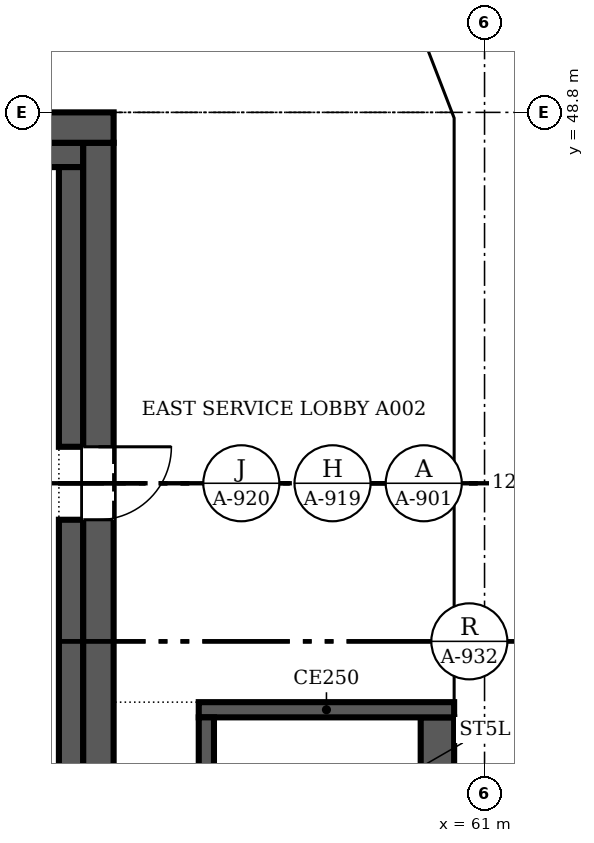
"""IFC4 building model, lengths in metres.
Left out: names, types, materials, properties, quantities, classifications, styles, units other than length and angle.
Written with IfcOpenShell. Run it as: python <this file> out.ifc"""

import sys

from ifc_helpers import new_model, si_unit, direction, frame, frame_2d, origin, place, context, subcontext, project, spatial, polyline, rectangle, outline, extrude, faceted_brep, source, transform, mapped, element, fill, save


model = new_model("IFC4")
c1 = context("Model", 3, precision=1e-05, world=origin(), true_north=direction((0.0, 1.0)))
c2 = subcontext(c1, "Body", "Model", "MODEL_VIEW")
j1 = project(units=[si_unit("LENGTHUNIT", "METRE"), si_unit("PLANEANGLEUNIT", "RADIAN")], contexts=[c1])
p1 = place(None, origin())
s1 = spatial("IfcSite", under=j1, at=p1, CompositionType="ELEMENT")
p2 = place(p1, origin())
s2 = spatial("IfcBuilding", under=s1, at=p2, CompositionType="ELEMENT")
p3 = place(p2, frame((0.0, 0.0, 209.3)))
s3 = spatial("IfcBuildingStorey", under=s2, at=p3, CompositionType="ELEMENT", Elevation=209.3)
m1 = source(origin(), c2, "Body", "Brep", [
    faceted_brep([(3.05, -0.25, 0.0), (6.1, -0.25, 3.8), (6.1, -0.25, 3.8), (3.05, -0.25, 7.6), (0.0, -0.25, 3.8), (0.0, 0.25, 3.8), (3.05, 0.25, 7.6), (6.1, 0.25, 3.8), (6.1, 0.25, 3.8), (3.05, 0.25, 0.0)], [[[0, 1, 2, 3, 4]], [[5, 6, 7, 8, 9]], [[9, 8, 1, 0]], [[7, 6, 3, 2]], [[6, 5, 4, 3]], [[5, 9, 0, 4]], [[1, 8, 7, 2]]]),
])
p4 = place(p3, frame((60.75, 33.55, -3.8), z_axis=(0.0, 0.0, 1.0), x_axis=(0.0, 1.0, 0.0)))
e1 = element("IfcWall", 1, at=p4, inside=s3, PredefinedType="SOLIDWALL", context=c2, shape_type="MappedRepresentation", body=[
    mapped(m1, transform((0.0, 0.0, 0.0), scale=1.0)),
])
m2 = source(origin(), c2, "Body", "SweptSolid", [
    extrude(outline(polyline([(3.05, 0.399), (5.78, 3.8), (3.05, 7.201), (0.321, 3.8), (3.05, 0.399)])), frame((0.0, 0.26, 0.0), z_axis=(0.0, -1.0, 0.0), x_axis=(1.0, 0.0, 0.0)), (0.0, 0.0, 1.0), 0.52),
])
p5 = place(p4, origin())
e2 = element("IfcOpeningElement", 2, at=p5, cuts=e1, PredefinedType="OPENING", context=c2, shape_type="MappedRepresentation", body=[
    mapped(m2, transform((0.0, 0.0, 0.0), scale=1.0)),
])
m3 = source(origin(), c2, "Body", "SweptSolid", [
    extrude(outline(polyline([(3.05, 0.0), (6.1, 3.8), (3.05, 7.6), (0.0, 3.8), (3.05, 0.0)])), frame((0.0, 0.25, 0.0), z_axis=(0.0, -1.0, 0.0), x_axis=(1.0, 0.0, 0.0)), (0.0, 0.0, 1.0), 0.5),
])
p6 = place(p3, frame((60.75, 39.65, -3.8), z_axis=(0.0, 0.0, 1.0), x_axis=(0.0, 1.0, 0.0)))
e3 = element("IfcWall", 3, at=p6, inside=s3, PredefinedType="SOLIDWALL", context=c2, shape_type="MappedRepresentation", body=[
    mapped(m3, transform((0.0, 0.0, 0.0), scale=1.0)),
])
p7 = place(p6, origin())
e4 = element("IfcOpeningElement", 4, at=p7, cuts=e3, PredefinedType="OPENING", context=c2, shape_type="MappedRepresentation", body=[
    mapped(m2, transform((0.0, 0.0, 0.0), scale=1.0)),
])
m4 = source(origin(), c2, "Body", "Brep", [
    faceted_brep([(3.003, -0.25, 0.0), (3.05, -0.25, 0.06), (3.05, -0.25, 7.54), (3.003, -0.25, 7.6), (0.0, -0.25, 3.8), (0.0, 0.25, 3.8), (2.957, 0.25, 7.541), (2.957, 0.25, 0.059), (3.003, 0.0, 0.0), (3.003, 0.0, 7.6)], [[[0, 1, 2, 3, 4]], [[5, 6, 7]], [[1, 0, 8]], [[9, 3, 2]], [[6, 5, 4, 3, 9]], [[5, 7, 8, 0, 4]], [[1, 8, 7, 6, 9, 2]]]),
])
p8 = place(p3, frame((60.75, 45.75, -3.8), z_axis=(0.0, 0.0, 1.0), x_axis=(0.0, 1.0, 0.0)))
e5 = element("IfcWall", 5, at=p8, inside=s3, PredefinedType="SOLIDWALL", context=c2, shape_type="MappedRepresentation", body=[
    mapped(m4, transform((0.0, 0.0, 0.0), scale=1.0)),
])
m5 = source(origin(), c2, "Body", "SweptSolid", [
    extrude(outline(polyline([(2.803, 6.944), (0.319, 3.8), (2.803, 0.656), (2.803, 6.944)])), frame((0.0, 0.26, 0.0), z_axis=(0.0, -1.0, 0.0), x_axis=(1.0, 0.0, 0.0)), (0.0, 0.0, 1.0), 0.52),
])
p9 = place(p8, origin())
e6 = element("IfcOpeningElement", 6, at=p9, cuts=e5, PredefinedType="OPENING", context=c2, shape_type="MappedRepresentation", body=[
    mapped(m5, transform((0.0, 0.0, 0.0), scale=1.0)),
])
m6 = source(origin(), c2, "Body", "Brep", [
    faceted_brep([(0.047, -0.25, 0.0), (2.997, -0.25, 3.8), (0.047, -0.25, 7.6), (0.0, -0.25, 7.541), (0.0, -0.25, 0.059), (0.093, 0.25, 7.54), (2.944, 0.25, 3.868), (2.944, 0.25, 3.732), (0.093, 0.25, 0.06), (2.997, 0.0, 3.8), (0.047, 0.0, 0.0), (0.047, 0.0, 7.6)], [[[0, 1, 2, 3, 4]], [[5, 6, 7, 8]], [[8, 7, 9, 1, 0, 10]], [[6, 5, 11, 2, 1, 9]], [[3, 2, 11]], [[10, 0, 4]], [[8, 10, 4, 3, 11, 5]], [[9, 7, 6]]]),
])
p10 = place(p3, frame((60.767, 48.71, -3.8), z_axis=(0.0, 0.0, 1.0), x_axis=(-0.359901446078, 0.932990326376, 0.0)))
e7 = element("IfcWall", 7, at=p10, inside=s3, PredefinedType="SOLIDWALL", context=c2, shape_type="MappedRepresentation", body=[
    mapped(m6, transform((0.0, 0.0, 0.0), scale=1.0)),
])
m7 = source(origin(), c2, "Body", "SweptSolid", [
    extrude(outline(polyline([(0.247, 0.665), (2.681, 3.8), (0.247, 6.935), (0.247, 0.665)])), frame((0.0, 0.26, 0.0), z_axis=(0.0, -1.0, 0.0), x_axis=(1.0, 0.0, 0.0)), (0.0, 0.0, 1.0), 0.52),
])
p11 = place(p10, origin())
e8 = element("IfcOpeningElement", 8, at=p11, cuts=e7, PredefinedType="OPENING", context=c2, shape_type="MappedRepresentation", body=[
    mapped(m7, transform((0.0, 0.0, 0.0), scale=1.0)),
])
p12 = place(p2, frame((0.0, 0.0, 213.1)))
s4 = spatial("IfcBuildingStorey", under=s2, at=p12, CompositionType="ELEMENT", Elevation=213.1)
m8 = source(origin(), c2, "Body", "Brep", [
    faceted_brep([(3.05, -0.25, 0.0), (6.1, -0.25, 3.8), (6.1, -0.25, 3.8), (3.05, -0.25, 7.6), (0.0, -0.25, 3.8), (0.0, 0.25, 3.8), (3.05, 0.25, 7.6), (6.1, 0.25, 3.8), (6.1, 0.25, 3.8), (3.05, 0.25, 0.0)], [[[0, 1, 2, 3, 4]], [[5, 6, 7, 8, 9]], [[9, 8, 1, 0]], [[7, 6, 3, 2]], [[6, 5, 4, 3]], [[5, 9, 0, 4]], [[1, 8, 7, 2]]]),
])
p13 = place(p12, frame((60.75, 36.6, -3.8), z_axis=(0.0, 0.0, 1.0), x_axis=(0.0, 1.0, 0.0)))
e9 = element("IfcWall", 9, at=p13, inside=s4, PredefinedType="SOLIDWALL", context=c2, shape_type="MappedRepresentation", body=[
    mapped(m8, transform((0.0, 0.0, 0.0), scale=1.0)),
])
m9 = source(origin(), c2, "Body", "SweptSolid", [
    extrude(outline(polyline([(3.05, 0.399), (5.78, 3.8), (3.05, 7.2), (0.321, 3.8), (3.05, 0.399)])), frame((0.0, 0.26, 0.0), z_axis=(0.0, -1.0, 0.0), x_axis=(1.0, 0.0, 0.0)), (0.0, 0.0, 1.0), 0.52),
])
p14 = place(p13, origin())
e10 = element("IfcOpeningElement", 10, at=p14, cuts=e9, PredefinedType="OPENING", context=c2, shape_type="MappedRepresentation", body=[
    mapped(m9, transform((0.0, 0.0, 0.0), scale=1.0)),
])
m10 = source(origin(), c2, "Body", "Brep", [
    faceted_brep([(3.05, -0.25, 0.0), (6.053, -0.25, 3.8), (3.05, -0.25, 7.6), (0.0, -0.25, 3.8), (0.0, 0.25, 3.8), (3.05, 0.25, 7.6), (6.007, 0.25, 3.859), (6.007, 0.25, 3.741), (3.05, 0.25, 0.0), (6.053, 0.0, 3.8)], [[[0, 1, 2, 3]], [[4, 5, 6, 7, 8]], [[8, 7, 9, 1, 0]], [[6, 5, 2, 1, 9]], [[5, 4, 3, 2]], [[4, 8, 0, 3]], [[7, 6, 9]]]),
])
p15 = place(p12, frame((60.75, 42.7, -3.8), z_axis=(0.0, 0.0, 1.0), x_axis=(0.0, 1.0, 0.0)))
e11 = element("IfcWall", 11, at=p15, inside=s4, PredefinedType="SOLIDWALL", context=c2, shape_type="MappedRepresentation", body=[
    mapped(m10, transform((0.0, 0.0, 0.0), scale=1.0)),
])
m11 = source(origin(), c2, "Body", "SweptSolid", [
    extrude(outline(polyline([(3.049, 0.401), (5.735, 3.8), (3.049, 7.199), (0.321, 3.8), (3.049, 0.401)])), frame((0.0, 0.26, 0.0), z_axis=(0.0, -1.0, 0.0), x_axis=(1.0, 0.0, 0.0)), (0.0, 0.0, 1.0), 0.52),
])
p16 = place(p15, origin())
e12 = element("IfcOpeningElement", 12, at=p16, cuts=e11, PredefinedType="OPENING", context=c2, shape_type="MappedRepresentation", body=[
    mapped(m11, transform((0.0, 0.0, 0.0), scale=1.0)),
])
m12 = source(origin(), c2, "Body", "Brep", [
    faceted_brep([(2.95, -0.25, 0.0), (3.003, -0.25, 0.068), (3.003, -0.25, 7.531), (2.95, -0.25, 7.6), (0.0, -0.25, 3.8), (0.047, 0.25, 3.86), (2.898, 0.25, 7.532), (2.898, 0.25, 0.068), (0.047, 0.25, 3.74), (2.95, 0.0, 0.0), (2.95, 0.0, 7.6), (0.0, 0.0, 3.8)], [[[0, 1, 2, 3, 4]], [[5, 6, 7, 8]], [[1, 0, 9]], [[10, 3, 2]], [[6, 5, 11, 4, 3, 10]], [[8, 7, 9, 0, 4, 11]], [[8, 11, 5]], [[1, 9, 7, 6, 10, 2]]]),
])
p17 = place(p12, frame((60.75, 48.753, -3.8), z_axis=(0.0, 0.0, 1.0), x_axis=(-0.35992665181, 0.932980602862, 0.0)))
e13 = element("IfcWall", 13, at=p17, inside=s4, PredefinedType="SOLIDWALL", context=c2, shape_type="MappedRepresentation", body=[
    mapped(m12, transform((0.0, 0.0, 0.0), scale=1.0)),
])
m13 = source(origin(), c2, "Body", "SweptSolid", [
    extrude(outline(polyline([(2.75, 6.935), (0.316, 3.8), (2.75, 0.665), (2.75, 6.935)])), frame((0.0, 0.26, 0.0), z_axis=(0.0, -1.0, 0.0), x_axis=(1.0, 0.0, 0.0)), (0.0, 0.0, 1.0), 0.52),
])
p18 = place(p17, origin())
e14 = element("IfcOpeningElement", 14, at=p18, cuts=e13, PredefinedType="OPENING", context=c2, shape_type="MappedRepresentation", body=[
    mapped(m13, transform((0.0, 0.0, 0.0), scale=1.0)),
])
p19 = place(p3, frame((30.5, 48.55, 0.0), z_axis=(0.0, 0.0, 1.0), x_axis=(1.0, 0.0, 0.0)))
e15 = element("IfcWall", 15, at=p19, inside=s3, PredefinedType="SHEAR", context=c2, shape_type="SweptSolid", body=[
    extrude(rectangle(XDim=24.4, YDim=0.5, at=frame_2d((12.2, 0.0))), origin(), (0.0, 0.0, 1.0), 3.8),
])
p20 = place(p3, frame((54.65, 48.3, 0.0), z_axis=(0.0, 0.0, 1.0), x_axis=(0.0, -1.0, 0.0)))
e16 = element("IfcWall", 16, at=p20, inside=s3, PredefinedType="SHEAR", context=c2, shape_type="SweptSolid", body=[
    extrude(rectangle(XDim=23.4, YDim=0.5, at=frame_2d((11.7, 0.0))), origin(), (0.0, 0.0, 1.0), 3.8),
])
m14 = source(origin(), c2, "Body", "SweptSolid", [
    extrude(rectangle(XDim=1.2, YDim=2.1, at=frame_2d((0.6, 1.05))), frame((0.0, 0.26, 0.0), z_axis=(0.0, -1.0, 0.0), x_axis=(1.0, 0.0, 0.0)), (0.0, 0.0, 1.0), 0.52),
])
p21 = place(p20, frame((5.0, 0.0, 0.0)))
e17 = element("IfcOpeningElement", 17, at=p21, cuts=e16, PredefinedType="OPENING", context=c2, shape_type="MappedRepresentation", body=[
    mapped(m14, transform((0.0, 0.0, 0.0), scale=1.0)),
])
p22 = place(p3, frame((31.0, 48.1, 0.0), z_axis=(0.0, 0.0, 1.0), x_axis=(1.0, 0.0, 0.0)))
e18 = element("IfcWall", 18, at=p22, inside=s3, PredefinedType="SOLIDWALL", context=c2, shape_type="SweptSolid", body=[
    extrude(rectangle(XDim=23.4, YDim=0.4, at=frame_2d((11.7, 0.0))), origin(), (0.0, 0.0, 1.0), 3.8),
])
p23 = place(p3, frame((54.2, 36.88, 0.0), z_axis=(0.0, 0.0, 1.0), x_axis=(0.0, 1.0, 0.0)))
e19 = element("IfcWall", 19, at=p23, inside=s3, PredefinedType="SOLIDWALL", context=c2, shape_type="SweptSolid", body=[
    extrude(rectangle(XDim=5.22, YDim=0.4, at=frame_2d((2.61, 0.0))), origin(), (0.0, 0.0, 1.0), 3.8),
])
p24 = place(p3, frame((54.2, 43.3, 0.0), z_axis=(0.0, 0.0, 1.0), x_axis=(0.0, 1.0, 0.0)))
e20 = element("IfcWall", 20, at=p24, inside=s3, PredefinedType="SOLIDWALL", context=c2, shape_type="SweptSolid", body=[
    extrude(rectangle(XDim=4.6, YDim=0.4, at=frame_2d((2.3, 0.0))), origin(), (0.0, 0.0, 1.0), 3.8),
])
p25 = place(p3, frame((56.425, 30.85, 0.0), z_axis=(0.0, 0.0, 1.0), x_axis=(0.0, 1.0, 0.0)))
e21 = element("IfcWall", 21, at=p25, inside=s3, PredefinedType="SOLIDWALL", context=c2, shape_type="SweptSolid", body=[
    extrude(rectangle(XDim=8.0, YDim=0.25, at=frame_2d((4.0, 0.0))), origin(), (0.0, 0.0, 1.0), 3.8),
])
p26 = place(p3, frame((56.3, 38.975, 0.0), z_axis=(0.0, 0.0, 1.0), x_axis=(1.0, 0.0, 0.0)))
e22 = element("IfcWall", 22, at=p26, inside=s3, PredefinedType="SOLIDWALL", context=c2, shape_type="SweptSolid", body=[
    extrude(rectangle(XDim=4.2, YDim=0.25, at=frame_2d((2.1, 0.0))), origin(), (0.0, 0.0, 1.0), 3.8),
])
p27 = place(p3, frame((60.225, 38.85, 0.0), z_axis=(0.0, 0.0, 1.0), x_axis=(0.0, -1.0, 0.0)))
e23 = element("IfcWall", 23, at=p27, inside=s3, PredefinedType="SOLIDWALL", context=c2, shape_type="SweptSolid", body=[
    extrude(rectangle(XDim=8.0, YDim=0.55, at=frame_2d((4.0, 0.0))), origin(), (0.0, 0.0, 1.0), 3.8),
])
m15 = source(origin(), c2, "Body", "SweptSolid", [
    extrude(rectangle(XDim=1.2, YDim=2.1, at=frame_2d((0.6, 1.05))), frame((0.0, 0.025, 0.0), z_axis=(0.0, -1.0, 0.0), x_axis=(1.0, 0.0, 0.0)), (0.0, 0.0, 1.0), 0.05),
])
p28 = place(p21, origin())
e24 = element("IfcDoor", 24, at=p28, inside=s3, OperationType="SINGLE_SWING_LEFT", PredefinedType="DOOR", context=c2, shape_type="MappedRepresentation", body=[
    mapped(m15, transform((0.0, 0.0, 0.0), scale=1.0)),
])
fill(e17, e24)
save(model, sys.argv[1])
